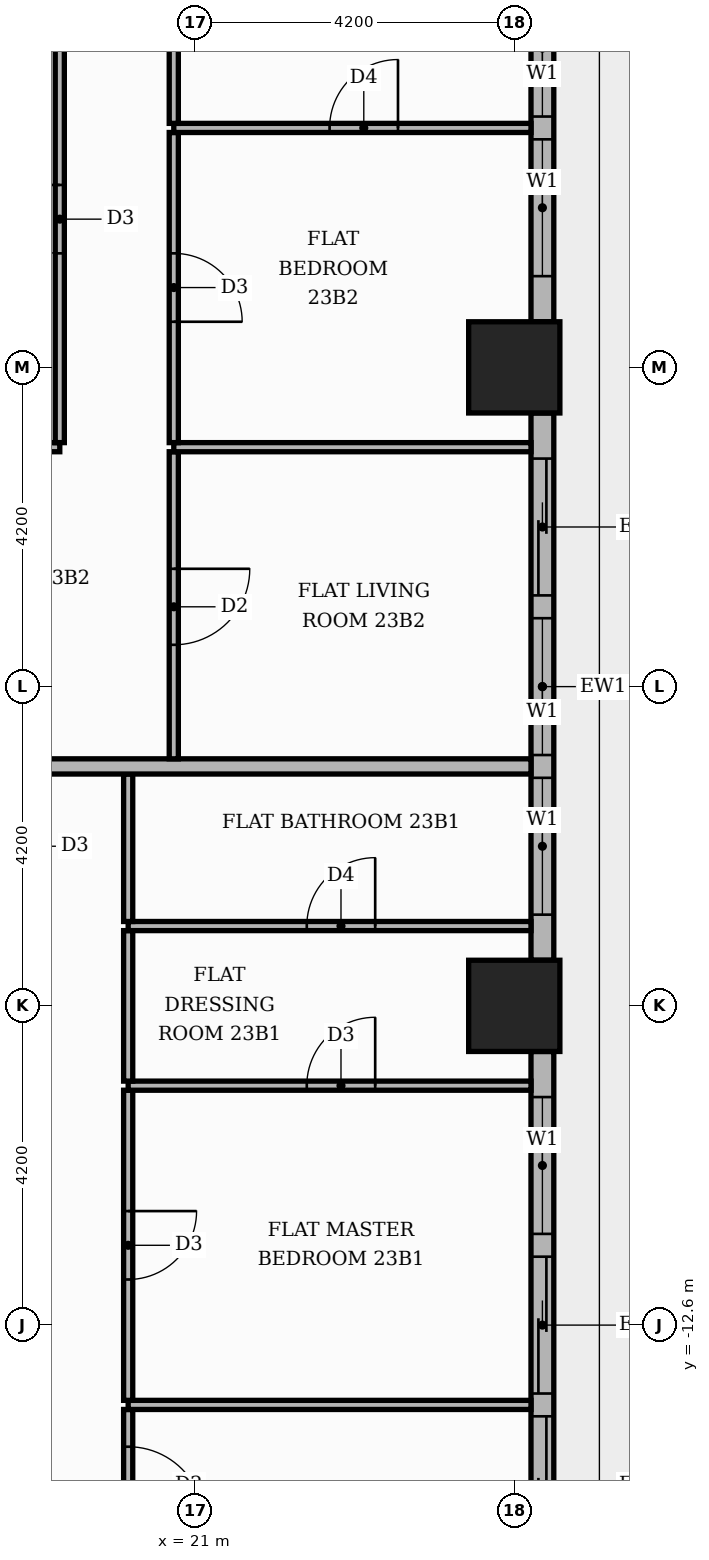
"""IFC4 building model, lengths in metres.
Left out: names, types, materials, properties, quantities, classifications, styles, units other than length and angle.
Written with IfcOpenShell. Run it as: python <this file> out.ifc"""

import sys

from ifc_helpers import new_model, si_unit, direction, frame, frame_2d, origin, origin_2d, place, context, subcontext, project, spatial, rectangle, extrude, element, fill, save


model = new_model("IFC4")
c1 = context("Model", 3, precision=1e-05, world=origin(), true_north=direction((0.0, 1.0)))
c2 = subcontext(c1, "Body", "Model", "MODEL_VIEW")
j1 = project(units=[si_unit("LENGTHUNIT", "METRE"), si_unit("PLANEANGLEUNIT", "RADIAN")], contexts=[c1])
p1 = place(None, origin())
s1 = spatial("IfcSite", under=j1, at=p1, CompositionType="ELEMENT")
p2 = place(p1, origin())
s2 = spatial("IfcBuilding", under=s1, at=p2, CompositionType="ELEMENT")
p3 = place(p2, frame((0.0, 0.0, 98.7)))
s3 = spatial("IfcBuildingStorey", under=s2, at=p3, CompositionType="ELEMENT", Elevation=98.7)
for number, where, z_axis, x_axis in (
    (1, (25.2, 0.0, 0.0), (0.0, 0.0, 1.0), (1.0, 0.0, 0.0)),
    (2, (25.2, -8.4, 0.0), (0.0, 0.0, 1.0), (1.0, 0.0, 0.0)),
):
    element("IfcColumn", number, at=place(p3, frame(where, z_axis=z_axis, x_axis=x_axis)), inside=s3, PredefinedType="COLUMN", context=c2, shape_type="SweptSolid", body=[
        extrude(rectangle(XDim=1.2, YDim=1.2, at=origin_2d()), origin(), (0.0, 0.0, 1.0), 3.9),
    ])
p4 = place(p3, frame((25.57, -16.2, 0.0), z_axis=(0.0, 0.0, 1.0), x_axis=(0.0, 1.0, 0.0)))
e3 = element("IfcWall", 3, at=p4, inside=s3, PredefinedType="STANDARD", context=c2, shape_type="SweptSolid", body=[
    extrude(rectangle(XDim=7.2, YDim=0.3, at=frame_2d((3.6, 0.0))), origin(), (0.0, 0.0, 1.0), 3.48),
])
p5 = place(p4, frame((0.6, 0.0, 0.0)))
e4 = element("IfcOpeningElement", 4, at=p5, cuts=e3, PredefinedType="OPENING", context=c2, shape_type="SweptSolid", body=[
    extrude(rectangle(XDim=1.8, YDim=2.4, at=frame_2d((0.9, 1.2))), frame((0.0, 0.16, 0.0), z_axis=(0.0, -1.0, 0.0), x_axis=(1.0, 0.0, 0.0)), (0.0, 0.0, 1.0), 0.32),
])
p6 = place(p4, frame((2.7, 0.0, 0.0)))
e5 = element("IfcOpeningElement", 5, at=p6, cuts=e3, PredefinedType="OPENING", context=c2, shape_type="SweptSolid", body=[
    extrude(rectangle(XDim=1.8, YDim=2.4, at=frame_2d((0.9, 1.2))), frame((0.0, 0.16, 0.0), z_axis=(0.0, -1.0, 0.0), x_axis=(1.0, 0.0, 0.0)), (0.0, 0.0, 1.0), 0.32),
])
p7 = place(p4, frame((4.8, 0.0, 0.9)))
e6 = element("IfcOpeningElement", 6, at=p7, cuts=e3, PredefinedType="OPENING", context=c2, shape_type="SweptSolid", body=[
    extrude(rectangle(XDim=1.8, YDim=2.1, at=frame_2d((0.9, 1.05))), frame((0.0, 0.16, 0.0), z_axis=(0.0, -1.0, 0.0), x_axis=(1.0, 0.0, 0.0)), (0.0, 0.0, 1.0), 0.32),
])
p8 = place(p3, frame((25.57, -7.8, 0.0), z_axis=(0.0, 0.0, 1.0), x_axis=(0.0, 1.0, 0.0)))
e7 = element("IfcWall", 7, at=p8, inside=s3, PredefinedType="STANDARD", context=c2, shape_type="SweptSolid", body=[
    extrude(rectangle(XDim=7.2, YDim=0.3, at=frame_2d((3.6, 0.0))), origin(), (0.0, 0.0, 1.0), 3.48),
])
p9 = place(p8, frame((0.6, 0.0, 0.9)))
e8 = element("IfcOpeningElement", 8, at=p9, cuts=e7, PredefinedType="OPENING", context=c2, shape_type="SweptSolid", body=[
    extrude(rectangle(XDim=1.8, YDim=2.1, at=frame_2d((0.9, 1.05))), frame((0.0, 0.16, 0.0), z_axis=(0.0, -1.0, 0.0), x_axis=(1.0, 0.0, 0.0)), (0.0, 0.0, 1.0), 0.32),
])
p10 = place(p8, frame((2.7, 0.0, 0.9)))
e9 = element("IfcOpeningElement", 9, at=p10, cuts=e7, PredefinedType="OPENING", context=c2, shape_type="SweptSolid", body=[
    extrude(rectangle(XDim=1.8, YDim=2.1, at=frame_2d((0.9, 1.05))), frame((0.0, 0.16, 0.0), z_axis=(0.0, -1.0, 0.0), x_axis=(1.0, 0.0, 0.0)), (0.0, 0.0, 1.0), 0.32),
])
p11 = place(p8, frame((4.8, 0.0, 0.0)))
e10 = element("IfcOpeningElement", 10, at=p11, cuts=e7, PredefinedType="OPENING", context=c2, shape_type="SweptSolid", body=[
    extrude(rectangle(XDim=1.8, YDim=2.4, at=frame_2d((0.9, 1.2))), frame((0.0, 0.16, 0.0), z_axis=(0.0, -1.0, 0.0), x_axis=(1.0, 0.0, 0.0)), (0.0, 0.0, 1.0), 0.32),
])
p12 = place(p3, frame((25.57, 0.6, 0.0), z_axis=(0.0, 0.0, 1.0), x_axis=(0.0, 1.0, 0.0)))
e11 = element("IfcWall", 11, at=p12, inside=s3, PredefinedType="STANDARD", context=c2, shape_type="SweptSolid", body=[
    extrude(rectangle(XDim=7.2, YDim=0.3, at=frame_2d((3.6, 0.0))), origin(), (0.0, 0.0, 1.0), 3.48),
])
p13 = place(p12, frame((0.6, 0.0, 0.9)))
e12 = element("IfcOpeningElement", 12, at=p13, cuts=e11, PredefinedType="OPENING", context=c2, shape_type="SweptSolid", body=[
    extrude(rectangle(XDim=1.8, YDim=2.1, at=frame_2d((0.9, 1.05))), frame((0.0, 0.16, 0.0), z_axis=(0.0, -1.0, 0.0), x_axis=(1.0, 0.0, 0.0)), (0.0, 0.0, 1.0), 0.32),
])
p14 = place(p12, frame((2.7, 0.0, 0.9)))
e13 = element("IfcOpeningElement", 13, at=p14, cuts=e11, PredefinedType="OPENING", context=c2, shape_type="SweptSolid", body=[
    extrude(rectangle(XDim=1.8, YDim=2.1, at=frame_2d((0.9, 1.05))), frame((0.0, 0.16, 0.0), z_axis=(0.0, -1.0, 0.0), x_axis=(1.0, 0.0, 0.0)), (0.0, 0.0, 1.0), 0.32),
])
p15 = place(p12, frame((4.8, 0.0, 0.0)))
e14 = element("IfcOpeningElement", 14, at=p15, cuts=e11, PredefinedType="OPENING", context=c2, shape_type="SweptSolid", body=[
    extrude(rectangle(XDim=1.8, YDim=2.4, at=frame_2d((0.9, 1.2))), frame((0.0, 0.16, 0.0), z_axis=(0.0, -1.0, 0.0), x_axis=(1.0, 0.0, 0.0)), (0.0, 0.0, 1.0), 0.32),
])
p16 = place(p3, frame((20.12, -15.69, 0.0), z_axis=(0.0, 0.0, 1.0), x_axis=(0.0, 1.0, 0.0)))
e15 = element("IfcWall", 15, at=p16, inside=s3, PredefinedType="PARTITIONING", context=c2, shape_type="SweptSolid", body=[
    extrude(rectangle(XDim=1.98, YDim=0.12, at=frame_2d((0.99, 0.0))), origin(), (0.0, 0.0, 1.0), 3.48),
])
p17 = place(p16, frame((0.49, 0.0, 0.0)))
e16 = element("IfcOpeningElement", 16, at=p17, cuts=e15, PredefinedType="OPENING", context=c2, shape_type="SweptSolid", body=[
    extrude(rectangle(XDim=1.0, YDim=2.1, at=frame_2d((0.5, 1.05))), frame((0.0, 0.07, 0.0), z_axis=(0.0, -1.0, 0.0), x_axis=(1.0, 0.0, 0.0)), (0.0, 0.0, 1.0), 0.14),
])
p18 = place(p3, frame((20.12, -13.65, 0.0), z_axis=(0.0, 0.0, 1.0), x_axis=(1.0, 0.0, 0.0)))
e17 = element("IfcWall", 17, at=p18, inside=s3, PredefinedType="PARTITIONING", context=c2, shape_type="SweptSolid", body=[
    extrude(rectangle(XDim=5.3, YDim=0.12, at=frame_2d((2.65, 0.0))), origin(), (0.0, 0.0, 1.0), 3.48),
])
p19 = place(p3, frame((20.12, -13.59, 0.0), z_axis=(0.0, 0.0, 1.0), x_axis=(0.0, 1.0, 0.0)))
e18 = element("IfcWall", 18, at=p19, inside=s3, PredefinedType="PARTITIONING", context=c2, shape_type="SweptSolid", body=[
    extrude(rectangle(XDim=4.08, YDim=0.12, at=frame_2d((2.04, 0.0))), origin(), (0.0, 0.0, 1.0), 3.48),
])
p20 = place(p19, frame((1.59, 0.0, 0.0)))
e19 = element("IfcOpeningElement", 19, at=p20, cuts=e18, PredefinedType="OPENING", context=c2, shape_type="SweptSolid", body=[
    extrude(rectangle(XDim=0.9, YDim=2.1, at=frame_2d((0.45, 1.05))), frame((0.0, 0.07, 0.0), z_axis=(0.0, -1.0, 0.0), x_axis=(1.0, 0.0, 0.0)), (0.0, 0.0, 1.0), 0.14),
])
p21 = place(p3, frame((20.12, -9.45, 0.0), z_axis=(0.0, 0.0, 1.0), x_axis=(1.0, 0.0, 0.0)))
e20 = element("IfcWall", 20, at=p21, inside=s3, PredefinedType="PARTITIONING", context=c2, shape_type="SweptSolid", body=[
    extrude(rectangle(XDim=5.3, YDim=0.12, at=frame_2d((2.65, 0.0))), origin(), (0.0, 0.0, 1.0), 3.48),
])
p22 = place(p21, frame((2.35, 0.0, 0.0)))
e21 = element("IfcOpeningElement", 21, at=p22, cuts=e20, PredefinedType="OPENING", context=c2, shape_type="SweptSolid", body=[
    extrude(rectangle(XDim=0.9, YDim=2.1, at=frame_2d((0.45, 1.05))), frame((0.0, 0.07, 0.0), z_axis=(0.0, -1.0, 0.0), x_axis=(1.0, 0.0, 0.0)), (0.0, 0.0, 1.0), 0.14),
])
p23 = place(p3, frame((20.12, -9.39, 0.0), z_axis=(0.0, 0.0, 1.0), x_axis=(0.0, 1.0, 0.0)))
e22 = element("IfcWall", 22, at=p23, inside=s3, PredefinedType="PARTITIONING", context=c2, shape_type="SweptSolid", body=[
    extrude(rectangle(XDim=1.98, YDim=0.12, at=frame_2d((0.99, 0.0))), origin(), (0.0, 0.0, 1.0), 3.48),
])
p24 = place(p3, frame((20.12, -7.35, 0.0), z_axis=(0.0, 0.0, 1.0), x_axis=(1.0, 0.0, 0.0)))
e23 = element("IfcWall", 23, at=p24, inside=s3, PredefinedType="PARTITIONING", context=c2, shape_type="SweptSolid", body=[
    extrude(rectangle(XDim=5.3, YDim=0.12, at=frame_2d((2.65, 0.0))), origin(), (0.0, 0.0, 1.0), 3.48),
])
p25 = place(p24, frame((2.35, 0.0, 0.0)))
e24 = element("IfcOpeningElement", 24, at=p25, cuts=e23, PredefinedType="OPENING", context=c2, shape_type="SweptSolid", body=[
    extrude(rectangle(XDim=0.9, YDim=2.1, at=frame_2d((0.45, 1.05))), frame((0.0, 0.07, 0.0), z_axis=(0.0, -1.0, 0.0), x_axis=(1.0, 0.0, 0.0)), (0.0, 0.0, 1.0), 0.14),
])
p26 = place(p3, frame((20.12, -7.29, 0.0), z_axis=(0.0, 0.0, 1.0), x_axis=(0.0, 1.0, 0.0)))
e25 = element("IfcWall", 25, at=p26, inside=s3, PredefinedType="PARTITIONING", context=c2, shape_type="SweptSolid", body=[
    extrude(rectangle(XDim=1.94, YDim=0.12, at=frame_2d((0.97, 0.0))), origin(), (0.0, 0.0, 1.0), 3.48),
])
p27 = place(p3, frame((13.65, -5.25, 0.0), z_axis=(0.0, 0.0, 1.0), x_axis=(1.0, 0.0, 0.0)))
e26 = element("IfcWall", 26, at=p27, inside=s3, PredefinedType="PARTITIONING", context=c2, shape_type="SweptSolid", body=[
    extrude(rectangle(XDim=11.77, YDim=0.2, at=frame_2d((5.885, 0.0))), origin(), (0.0, 0.0, 1.0), 3.48),
])
p28 = place(p3, frame((20.72, -5.15, 0.0), z_axis=(0.0, 0.0, 1.0), x_axis=(0.0, 1.0, 0.0)))
e27 = element("IfcWall", 27, at=p28, inside=s3, PredefinedType="PARTITIONING", context=c2, shape_type="SweptSolid", body=[
    extrude(rectangle(XDim=4.04, YDim=0.12, at=frame_2d((2.02, 0.0))), origin(), (0.0, 0.0, 1.0), 3.48),
])
p29 = place(p28, frame((1.5, 0.0, 0.0)))
e28 = element("IfcOpeningElement", 28, at=p29, cuts=e27, PredefinedType="OPENING", context=c2, shape_type="SweptSolid", body=[
    extrude(rectangle(XDim=1.0, YDim=2.1, at=frame_2d((0.5, 1.05))), frame((0.0, 0.07, 0.0), z_axis=(0.0, -1.0, 0.0), x_axis=(1.0, 0.0, 0.0)), (0.0, 0.0, 1.0), 0.14),
])
p30 = place(p3, frame((13.75, -1.05, 0.0), z_axis=(0.0, 0.0, 1.0), x_axis=(1.0, 0.0, 0.0)))
e29 = element("IfcWall", 29, at=p30, inside=s3, PredefinedType="PARTITIONING", context=c2, shape_type="SweptSolid", body=[
    extrude(rectangle(XDim=5.47, YDim=0.12, at=frame_2d((2.735, 0.0))), origin(), (0.0, 0.0, 1.0), 3.48),
])
p31 = place(p3, frame((20.72, -1.05, 0.0), z_axis=(0.0, 0.0, 1.0), x_axis=(1.0, 0.0, 0.0)))
e30 = element("IfcWall", 30, at=p31, inside=s3, PredefinedType="PARTITIONING", context=c2, shape_type="SweptSolid", body=[
    extrude(rectangle(XDim=4.7, YDim=0.12, at=frame_2d((2.35, 0.0))), origin(), (0.0, 0.0, 1.0), 3.48),
])
p32 = place(p3, frame((19.22, -0.99, 0.0), z_axis=(0.0, 0.0, 1.0), x_axis=(0.0, 1.0, 0.0)))
e31 = element("IfcWall", 31, at=p32, inside=s3, PredefinedType="PARTITIONING", context=c2, shape_type="SweptSolid", body=[
    extrude(rectangle(XDim=5.88, YDim=0.12, at=frame_2d((2.94, 0.0))), origin(), (0.0, 0.0, 1.0), 3.48),
])
p33 = place(p32, frame((2.49, 0.0, 0.0)))
e32 = element("IfcOpeningElement", 32, at=p33, cuts=e31, PredefinedType="OPENING", context=c2, shape_type="SweptSolid", body=[
    extrude(rectangle(XDim=0.9, YDim=2.1, at=frame_2d((0.45, 1.05))), frame((0.0, 0.07, 0.0), z_axis=(0.0, -1.0, 0.0), x_axis=(1.0, 0.0, 0.0)), (0.0, 0.0, 1.0), 0.14),
])
p34 = place(p3, frame((20.72, -0.99, 0.0), z_axis=(0.0, 0.0, 1.0), x_axis=(0.0, 1.0, 0.0)))
e33 = element("IfcWall", 33, at=p34, inside=s3, PredefinedType="PARTITIONING", context=c2, shape_type="SweptSolid", body=[
    extrude(rectangle(XDim=4.08, YDim=0.12, at=frame_2d((2.04, 0.0))), origin(), (0.0, 0.0, 1.0), 3.48),
])
p35 = place(p34, frame((1.59, 0.0, 0.0)))
e34 = element("IfcOpeningElement", 34, at=p35, cuts=e33, PredefinedType="OPENING", context=c2, shape_type="SweptSolid", body=[
    extrude(rectangle(XDim=0.9, YDim=2.1, at=frame_2d((0.45, 1.05))), frame((0.0, 0.07, 0.0), z_axis=(0.0, -1.0, 0.0), x_axis=(1.0, 0.0, 0.0)), (0.0, 0.0, 1.0), 0.14),
])
p36 = place(p3, frame((20.72, 3.15, 0.0), z_axis=(0.0, 0.0, 1.0), x_axis=(1.0, 0.0, 0.0)))
e35 = element("IfcWall", 35, at=p36, inside=s3, PredefinedType="PARTITIONING", context=c2, shape_type="SweptSolid", body=[
    extrude(rectangle(XDim=4.7, YDim=0.12, at=frame_2d((2.35, 0.0))), origin(), (0.0, 0.0, 1.0), 3.48),
])
p37 = place(p36, frame((2.05, 0.0, 0.0)))
e36 = element("IfcOpeningElement", 36, at=p37, cuts=e35, PredefinedType="OPENING", context=c2, shape_type="SweptSolid", body=[
    extrude(rectangle(XDim=0.9, YDim=2.1, at=frame_2d((0.45, 1.05))), frame((0.0, 0.07, 0.0), z_axis=(0.0, -1.0, 0.0), x_axis=(1.0, 0.0, 0.0)), (0.0, 0.0, 1.0), 0.14),
])
p38 = place(p3, frame((20.72, 3.21, 0.0), z_axis=(0.0, 0.0, 1.0), x_axis=(0.0, 1.0, 0.0)))
e37 = element("IfcWall", 37, at=p38, inside=s3, PredefinedType="PARTITIONING", context=c2, shape_type="SweptSolid", body=[
    extrude(rectangle(XDim=1.98, YDim=0.12, at=frame_2d((0.99, 0.0))), origin(), (0.0, 0.0, 1.0), 3.48),
])
p39 = place(p5, origin())
e38 = element("IfcDoor", 38, at=p39, inside=s3, OperationType="SLIDING_TO_LEFT", PredefinedType="DOOR", context=c2, shape_type="SweptSolid", body=[
    extrude(rectangle(XDim=1.8, YDim=2.4, at=frame_2d((0.9, 1.2))), frame((0.0, 0.025, 0.0), z_axis=(0.0, -1.0, 0.0), x_axis=(1.0, 0.0, 0.0)), (0.0, 0.0, 1.0), 0.05),
])
fill(e4, e38)
p40 = place(p6, origin())
e39 = element("IfcDoor", 39, at=p40, inside=s3, OperationType="SLIDING_TO_RIGHT", PredefinedType="DOOR", context=c2, shape_type="SweptSolid", body=[
    extrude(rectangle(XDim=1.8, YDim=2.4, at=frame_2d((0.9, 1.2))), frame((0.0, 0.025, 0.0), z_axis=(0.0, -1.0, 0.0), x_axis=(1.0, 0.0, 0.0)), (0.0, 0.0, 1.0), 0.05),
])
fill(e5, e39)
p41 = place(p7, origin())
e40 = element("IfcWindow", 40, at=p41, inside=s3, PartitioningType="SINGLE_PANEL", PredefinedType="WINDOW", context=c2, shape_type="SweptSolid", body=[
    extrude(rectangle(XDim=1.8, YDim=2.1, at=frame_2d((0.9, 1.05))), frame((0.0, 0.03, 0.0), z_axis=(0.0, -1.0, 0.0), x_axis=(1.0, 0.0, 0.0)), (0.0, 0.0, 1.0), 0.06),
])
fill(e6, e40)
p42 = place(p9, origin())
e41 = element("IfcWindow", 41, at=p42, inside=s3, PartitioningType="SINGLE_PANEL", PredefinedType="WINDOW", context=c2, shape_type="SweptSolid", body=[
    extrude(rectangle(XDim=1.8, YDim=2.1, at=frame_2d((0.9, 1.05))), frame((0.0, 0.03, 0.0), z_axis=(0.0, -1.0, 0.0), x_axis=(1.0, 0.0, 0.0)), (0.0, 0.0, 1.0), 0.06),
])
fill(e8, e41)
p43 = place(p10, origin())
e42 = element("IfcWindow", 42, at=p43, inside=s3, PartitioningType="SINGLE_PANEL", PredefinedType="WINDOW", context=c2, shape_type="SweptSolid", body=[
    extrude(rectangle(XDim=1.8, YDim=2.1, at=frame_2d((0.9, 1.05))), frame((0.0, 0.03, 0.0), z_axis=(0.0, -1.0, 0.0), x_axis=(1.0, 0.0, 0.0)), (0.0, 0.0, 1.0), 0.06),
])
fill(e9, e42)
p44 = place(p11, origin())
e43 = element("IfcDoor", 43, at=p44, inside=s3, OperationType="SLIDING_TO_RIGHT", PredefinedType="DOOR", context=c2, shape_type="SweptSolid", body=[
    extrude(rectangle(XDim=1.8, YDim=2.4, at=frame_2d((0.9, 1.2))), frame((0.0, 0.025, 0.0), z_axis=(0.0, -1.0, 0.0), x_axis=(1.0, 0.0, 0.0)), (0.0, 0.0, 1.0), 0.05),
])
fill(e10, e43)
p45 = place(p13, origin())
e44 = element("IfcWindow", 44, at=p45, inside=s3, PartitioningType="SINGLE_PANEL", PredefinedType="WINDOW", context=c2, shape_type="SweptSolid", body=[
    extrude(rectangle(XDim=1.8, YDim=2.1, at=frame_2d((0.9, 1.05))), frame((0.0, 0.03, 0.0), z_axis=(0.0, -1.0, 0.0), x_axis=(1.0, 0.0, 0.0)), (0.0, 0.0, 1.0), 0.06),
])
fill(e12, e44)
p46 = place(p14, origin())
e45 = element("IfcWindow", 45, at=p46, inside=s3, PartitioningType="SINGLE_PANEL", PredefinedType="WINDOW", context=c2, shape_type="SweptSolid", body=[
    extrude(rectangle(XDim=1.8, YDim=2.1, at=frame_2d((0.9, 1.05))), frame((0.0, 0.03, 0.0), z_axis=(0.0, -1.0, 0.0), x_axis=(1.0, 0.0, 0.0)), (0.0, 0.0, 1.0), 0.06),
])
fill(e13, e45)
p47 = place(p17, frame((1.0, 0.0, 0.0), z_axis=(0.0, 0.0, 1.0), x_axis=(-1.0, 0.0, 0.0)))
e46 = element("IfcDoor", 46, at=p47, inside=s3, OperationType="SINGLE_SWING_LEFT", PredefinedType="DOOR", context=c2, shape_type="SweptSolid", body=[
    extrude(rectangle(XDim=1.0, YDim=2.1, at=frame_2d((0.5, 1.05))), frame((0.0, 0.025, 0.0), z_axis=(0.0, -1.0, 0.0), x_axis=(1.0, 0.0, 0.0)), (0.0, 0.0, 1.0), 0.05),
])
fill(e16, e46)
p48 = place(p20, frame((0.9, 0.0, 0.0), z_axis=(0.0, 0.0, 1.0), x_axis=(-1.0, 0.0, 0.0)))
e47 = element("IfcDoor", 47, at=p48, inside=s3, OperationType="SINGLE_SWING_RIGHT", PredefinedType="DOOR", context=c2, shape_type="SweptSolid", body=[
    extrude(rectangle(XDim=0.9, YDim=2.1, at=frame_2d((0.45, 1.05))), frame((0.0, 0.025, 0.0), z_axis=(0.0, -1.0, 0.0), x_axis=(1.0, 0.0, 0.0)), (0.0, 0.0, 1.0), 0.05),
])
fill(e19, e47)
p49 = place(p22, origin())
e48 = element("IfcDoor", 48, at=p49, inside=s3, OperationType="SINGLE_SWING_RIGHT", PredefinedType="DOOR", context=c2, shape_type="SweptSolid", body=[
    extrude(rectangle(XDim=0.9, YDim=2.1, at=frame_2d((0.45, 1.05))), frame((0.0, 0.025, 0.0), z_axis=(0.0, -1.0, 0.0), x_axis=(1.0, 0.0, 0.0)), (0.0, 0.0, 1.0), 0.05),
])
fill(e21, e48)
p50 = place(p25, origin())
e49 = element("IfcDoor", 49, at=p50, inside=s3, OperationType="SINGLE_SWING_RIGHT", PredefinedType="DOOR", context=c2, shape_type="SweptSolid", body=[
    extrude(rectangle(XDim=0.9, YDim=2.1, at=frame_2d((0.45, 1.05))), frame((0.0, 0.025, 0.0), z_axis=(0.0, -1.0, 0.0), x_axis=(1.0, 0.0, 0.0)), (0.0, 0.0, 1.0), 0.05),
])
fill(e24, e49)
p51 = place(p33, origin())
e50 = element("IfcDoor", 50, at=p51, inside=s3, OperationType="SINGLE_SWING_RIGHT", PredefinedType="DOOR", context=c2, shape_type="SweptSolid", body=[
    extrude(rectangle(XDim=0.9, YDim=2.1, at=frame_2d((0.45, 1.05))), frame((0.0, 0.025, 0.0), z_axis=(0.0, -1.0, 0.0), x_axis=(1.0, 0.0, 0.0)), (0.0, 0.0, 1.0), 0.05),
])
fill(e32, e50)
p52 = place(p29, frame((1.0, 0.0, 0.0), z_axis=(0.0, 0.0, 1.0), x_axis=(-1.0, 0.0, 0.0)))
e51 = element("IfcDoor", 51, at=p52, inside=s3, OperationType="SINGLE_SWING_RIGHT", PredefinedType="DOOR", context=c2, shape_type="SweptSolid", body=[
    extrude(rectangle(XDim=1.0, YDim=2.1, at=frame_2d((0.5, 1.05))), frame((0.0, 0.025, 0.0), z_axis=(0.0, -1.0, 0.0), x_axis=(1.0, 0.0, 0.0)), (0.0, 0.0, 1.0), 0.05),
])
fill(e28, e51)
p53 = place(p35, frame((0.9, 0.0, 0.0), z_axis=(0.0, 0.0, 1.0), x_axis=(-1.0, 0.0, 0.0)))
e52 = element("IfcDoor", 52, at=p53, inside=s3, OperationType="SINGLE_SWING_LEFT", PredefinedType="DOOR", context=c2, shape_type="SweptSolid", body=[
    extrude(rectangle(XDim=0.9, YDim=2.1, at=frame_2d((0.45, 1.05))), frame((0.0, 0.025, 0.0), z_axis=(0.0, -1.0, 0.0), x_axis=(1.0, 0.0, 0.0)), (0.0, 0.0, 1.0), 0.05),
])
fill(e34, e52)
p54 = place(p37, origin())
e53 = element("IfcDoor", 53, at=p54, inside=s3, OperationType="SINGLE_SWING_RIGHT", PredefinedType="DOOR", context=c2, shape_type="SweptSolid", body=[
    extrude(rectangle(XDim=0.9, YDim=2.1, at=frame_2d((0.45, 1.05))), frame((0.0, 0.025, 0.0), z_axis=(0.0, -1.0, 0.0), x_axis=(1.0, 0.0, 0.0)), (0.0, 0.0, 1.0), 0.05),
])
fill(e36, e53)
save(model, sys.argv[1])
